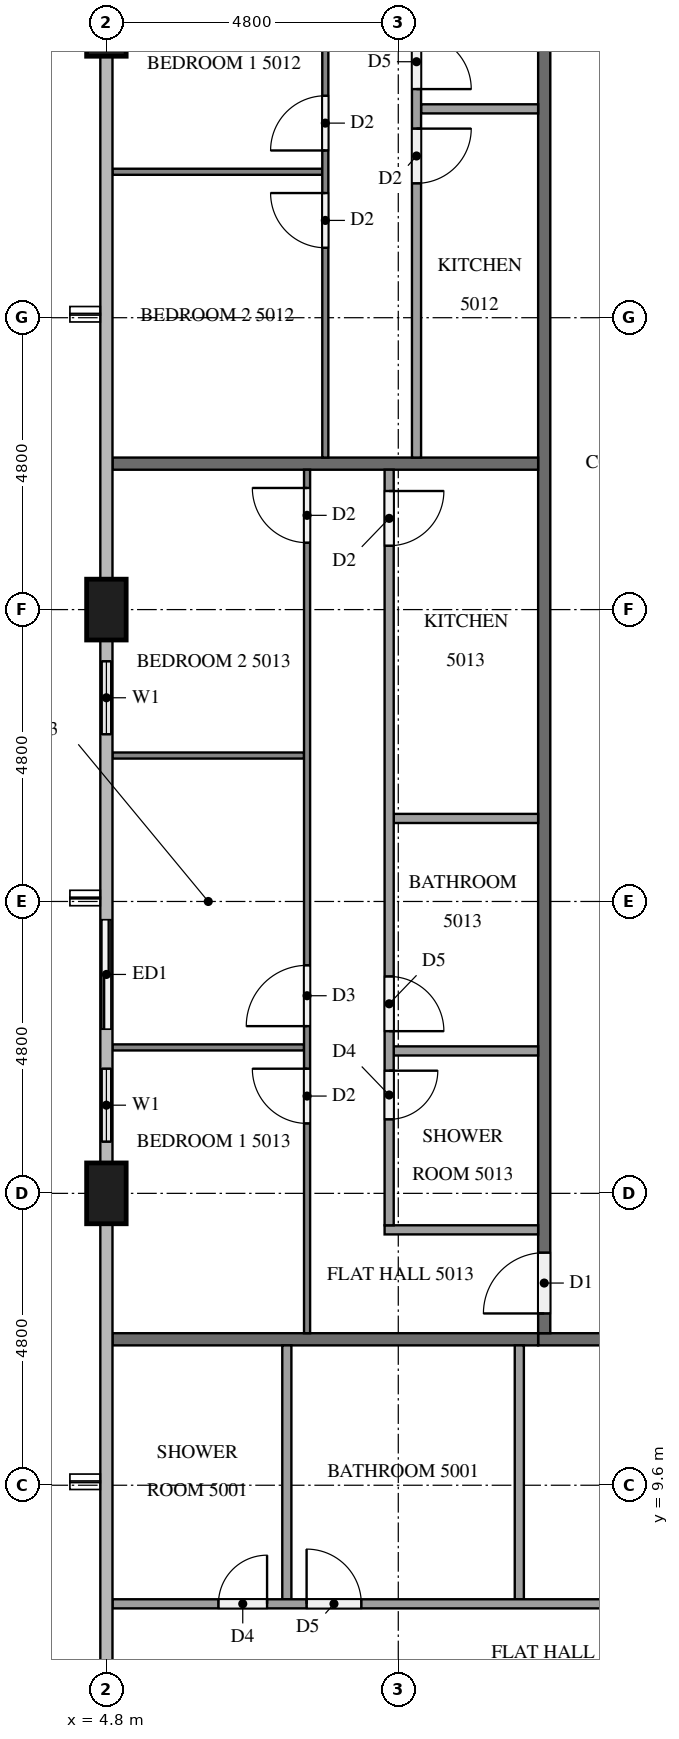
"""IFC4 building model, lengths in metres.
Left out: names, types, materials, properties, quantities, classifications, styles, units other than length and angle.
Written with IfcOpenShell. Run it as: python <this file> out.ifc"""

import sys

from ifc_helpers import new_model, si_unit, direction, frame, frame_2d, origin, origin_2d, place, context, subcontext, project, spatial, rectangle, extrude, element, fill, save


model = new_model("IFC4")
c1 = context("Model", 3, precision=1e-05, world=origin(), true_north=direction((0.0, 1.0)))
c2 = subcontext(c1, "Body", "Model", "MODEL_VIEW")
j1 = project(units=[si_unit("LENGTHUNIT", "METRE"), si_unit("PLANEANGLEUNIT", "RADIAN")], contexts=[c1])
p1 = place(None, origin())
s1 = spatial("IfcSite", under=j1, at=p1, CompositionType="ELEMENT")
p2 = place(p1, origin())
s2 = spatial("IfcBuilding", under=s1, at=p2, CompositionType="ELEMENT")
p3 = place(p2, frame((0.0, 0.0, 192.9)))
s3 = spatial("IfcBuildingStorey", under=s2, at=p3, CompositionType="ELEMENT", Elevation=192.9)
for number, where, z_axis, x_axis in (
    (1, (4.8, 33.6, 0.0), (0.0, 0.0, 1.0), (0.0, 1.0, 0.0)),
    (2, (4.8, 24.0, 0.0), (0.0, 0.0, 1.0), (0.0, 1.0, 0.0)),
    (3, (4.8, 14.4, 0.0), (0.0, 0.0, 1.0), (0.0, 1.0, 0.0)),
):
    element("IfcColumn", number, at=place(p3, frame(where, z_axis=z_axis, x_axis=x_axis)), inside=s3, PredefinedType="COLUMN", context=c2, shape_type="SweptSolid", body=[
        extrude(rectangle(XDim=1.0, YDim=0.65, at=origin_2d()), origin(), (0.0, 0.0, 1.0), 3.2),
    ])
p4 = place(p3, frame((4.8, 23.5, 0.0), z_axis=(0.0, 0.0, 1.0), x_axis=(0.0, -1.0, 0.0)))
e4 = element("IfcWall", 4, at=p4, inside=s3, PredefinedType="SOLIDWALL", context=c2, shape_type="SweptSolid", body=[
    extrude(rectangle(XDim=1.9, YDim=0.15, at=frame_2d((0.95, 0.0))), origin(), (0.0, 0.0, 1.0), 3.2),
])
p5 = place(p4, frame((0.35, 0.0, 0.9)))
e5 = element("IfcOpeningElement", 5, at=p5, cuts=e4, PredefinedType="OPENING", context=c2, shape_type="SweptSolid", body=[
    extrude(rectangle(XDim=1.2, YDim=1.4, at=frame_2d((0.6, 0.7))), frame((0.0, 0.085, 0.0), z_axis=(0.0, -1.0, 0.0), x_axis=(1.0, 0.0, 0.0)), (0.0, 0.0, 1.0), 0.17),
])
p6 = place(p3, frame((4.8, 19.2, 0.0), z_axis=(0.0, 0.0, 1.0), x_axis=(0.0, -1.0, 0.0)))
e6 = element("IfcWall", 6, at=p6, inside=s3, PredefinedType="SOLIDWALL", context=c2, shape_type="SweptSolid", body=[
    extrude(rectangle(XDim=4.3, YDim=0.15, at=frame_2d((2.15, 0.0))), origin(), (0.0, 0.0, 1.0), 3.2),
])
p7 = place(p6, frame((0.3, 0.0, 0.0)))
e7 = element("IfcOpeningElement", 7, at=p7, cuts=e6, PredefinedType="OPENING", context=c2, shape_type="SweptSolid", body=[
    extrude(rectangle(XDim=1.8, YDim=2.4, at=frame_2d((0.9, 1.2))), frame((0.0, 0.085, 0.0), z_axis=(0.0, -1.0, 0.0), x_axis=(1.0, 0.0, 0.0)), (0.0, 0.0, 1.0), 0.17),
])
p8 = place(p6, frame((2.75, 0.0, 0.9)))
e8 = element("IfcOpeningElement", 8, at=p8, cuts=e6, PredefinedType="OPENING", context=c2, shape_type="SweptSolid", body=[
    extrude(rectangle(XDim=1.2, YDim=1.4, at=frame_2d((0.6, 0.7))), frame((0.0, 0.085, 0.0), z_axis=(0.0, -1.0, 0.0), x_axis=(1.0, 0.0, 0.0)), (0.0, 0.0, 1.0), 0.17),
])
p9 = place(p3, frame((50.5, 12.0, 0.0), z_axis=(0.0, 0.0, 1.0), x_axis=(-1.0, 0.0, 0.0)))
e9 = element("IfcWall", 9, at=p9, inside=s3, PredefinedType="PARTITIONING", context=c2, shape_type="SweptSolid", body=[
    extrude(rectangle(XDim=38.6, YDim=0.2, at=frame_2d((19.3, 0.0))), origin(), (0.0, 0.0, 1.0), 3.2),
])
p10 = place(p9, frame((31.725, 0.0, 0.0)))
e10 = element("IfcOpeningElement", 10, at=p10, cuts=e9, PredefinedType="OPENING", context=c2, shape_type="SweptSolid", body=[
    extrude(rectangle(XDim=1.0, YDim=2.1, at=frame_2d((0.5, 1.05))), frame((0.0, 0.11, 0.0), z_axis=(0.0, -1.0, 0.0), x_axis=(1.0, 0.0, 0.0)), (0.0, 0.0, 1.0), 0.22),
])
p11 = place(p9, frame((19.725, 0.0, 0.0)))
e11 = element("IfcOpeningElement", 11, at=p11, cuts=e9, PredefinedType="OPENING", context=c2, shape_type="SweptSolid", body=[
    extrude(rectangle(XDim=1.0, YDim=2.1, at=frame_2d((0.5, 1.05))), frame((0.0, 0.11, 0.0), z_axis=(0.0, -1.0, 0.0), x_axis=(1.0, 0.0, 0.0)), (0.0, 0.0, 1.0), 0.22),
])
p12 = place(p9, frame((17.875, 0.0, 0.0)))
e12 = element("IfcOpeningElement", 12, at=p12, cuts=e9, PredefinedType="OPENING", context=c2, shape_type="SweptSolid", body=[
    extrude(rectangle(XDim=1.0, YDim=2.1, at=frame_2d((0.5, 1.05))), frame((0.0, 0.11, 0.0), z_axis=(0.0, -1.0, 0.0), x_axis=(1.0, 0.0, 0.0)), (0.0, 0.0, 1.0), 0.22),
])
p13 = place(p9, frame((3.475, 0.0, 0.0)))
e13 = element("IfcOpeningElement", 13, at=p13, cuts=e9, PredefinedType="OPENING", context=c2, shape_type="SweptSolid", body=[
    extrude(rectangle(XDim=1.0, YDim=2.1, at=frame_2d((0.5, 1.05))), frame((0.0, 0.11, 0.0), z_axis=(0.0, -1.0, 0.0), x_axis=(1.0, 0.0, 0.0)), (0.0, 0.0, 1.0), 0.22),
])
p14 = place(p3, frame((12.0, 12.1, 0.0), z_axis=(0.0, 0.0, 1.0), x_axis=(0.0, 1.0, 0.0)))
e14 = element("IfcWall", 14, at=p14, inside=s3, PredefinedType="PARTITIONING", context=c2, shape_type="SweptSolid", body=[
    extrude(rectangle(XDim=28.6, YDim=0.2, at=frame_2d((14.3, 0.0))), origin(), (0.0, 0.0, 1.0), 3.2),
])
p15 = place(p14, frame((27.275, 0.0, 0.0)))
e15 = element("IfcOpeningElement", 15, at=p15, cuts=e14, PredefinedType="OPENING", context=c2, shape_type="SweptSolid", body=[
    extrude(rectangle(XDim=1.0, YDim=2.1, at=frame_2d((0.5, 1.05))), frame((0.0, 0.11, 0.0), z_axis=(0.0, -1.0, 0.0), x_axis=(1.0, 0.0, 0.0)), (0.0, 0.0, 1.0), 0.22),
])
p16 = place(p14, frame((0.325, 0.0, 0.0)))
e16 = element("IfcOpeningElement", 16, at=p16, cuts=e14, PredefinedType="OPENING", context=c2, shape_type="SweptSolid", body=[
    extrude(rectangle(XDim=1.0, YDim=2.1, at=frame_2d((0.5, 1.05))), frame((0.0, 0.11, 0.0), z_axis=(0.0, -1.0, 0.0), x_axis=(1.0, 0.0, 0.0)), (0.0, 0.0, 1.0), 0.22),
])
for number, where, z_axis, x_axis in (
    (17, (4.9, 12.0, 0.0), (0.0, 0.0, 1.0), (1.0, 0.0, 0.0)),
    (18, (4.9, 26.4, 0.0), (0.0, 0.0, 1.0), (1.0, 0.0, 0.0)),
):
    element("IfcWall", number, at=place(p3, frame(where, z_axis=z_axis, x_axis=x_axis)), inside=s3, PredefinedType="PARTITIONING", context=c2, shape_type="SweptSolid", body=[
        extrude(rectangle(XDim=7.0, YDim=0.2, at=frame_2d((3.5, 0.0))), origin(), (0.0, 0.0, 1.0), 3.2),
    ])
for number, where, z_axis, x_axis in (
    (19, (11.59, 11.9, 0.0), (0.0, 0.0, 1.0), (0.0, -1.0, 0.0)),
    (20, (7.767, 11.9, 0.0), (0.0, 0.0, 1.0), (0.0, -1.0, 0.0)),
):
    element("IfcWall", number, at=place(p3, frame(where, z_axis=z_axis, x_axis=x_axis)), inside=s3, PredefinedType="PARTITIONING", context=c2, shape_type="SweptSolid", body=[
        extrude(rectangle(XDim=4.175, YDim=0.15, at=frame_2d((2.087, 0.0))), origin(), (0.0, 0.0, 1.0), 3.2),
    ])
p17 = place(p3, frame((4.9, 7.65, 0.0), z_axis=(0.0, 0.0, 1.0), x_axis=(1.0, 0.0, 0.0)))
e21 = element("IfcWall", 21, at=p17, inside=s3, PredefinedType="PARTITIONING", context=c2, shape_type="SweptSolid", body=[
    extrude(rectangle(XDim=12.425, YDim=0.15, at=frame_2d((6.212, 0.0))), origin(), (0.0, 0.0, 1.0), 3.2),
])
p18 = place(p17, frame((11.225, 0.0, 0.0)))
e22 = element("IfcOpeningElement", 22, at=p18, cuts=e21, PredefinedType="OPENING", context=c2, shape_type="SweptSolid", body=[
    extrude(rectangle(XDim=0.9, YDim=2.1, at=frame_2d((0.45, 1.05))), frame((0.0, 0.085, 0.0), z_axis=(0.0, -1.0, 0.0), x_axis=(1.0, 0.0, 0.0)), (0.0, 0.0, 1.0), 0.17),
])
p19 = place(p17, frame((3.192, 0.0, 0.0)))
e23 = element("IfcOpeningElement", 23, at=p19, cuts=e21, PredefinedType="OPENING", context=c2, shape_type="SweptSolid", body=[
    extrude(rectangle(XDim=0.9, YDim=2.1, at=frame_2d((0.45, 1.05))), frame((0.0, 0.085, 0.0), z_axis=(0.0, -1.0, 0.0), x_axis=(1.0, 0.0, 0.0)), (0.0, 0.0, 1.0), 0.17),
])
p20 = place(p17, frame((1.742, 0.0, 0.0)))
e24 = element("IfcOpeningElement", 24, at=p20, cuts=e21, PredefinedType="OPENING", context=c2, shape_type="SweptSolid", body=[
    extrude(rectangle(XDim=0.8, YDim=2.1, at=frame_2d((0.4, 1.05))), frame((0.0, 0.085, 0.0), z_axis=(0.0, -1.0, 0.0), x_axis=(1.0, 0.0, 0.0)), (0.0, 0.0, 1.0), 0.17),
])
p21 = place(p3, frame((8.35, 31.2, 0.0), z_axis=(0.0, 0.0, 1.0), x_axis=(-1.0, 0.0, 0.0)))
e25 = element("IfcWall", 25, at=p21, inside=s3, PredefinedType="PARTITIONING", context=c2, shape_type="SweptSolid", body=[
    extrude(rectangle(XDim=3.45, YDim=0.1, at=frame_2d((1.725, 0.0))), origin(), (0.0, 0.0, 1.0), 3.2),
])
p22 = place(p3, frame((8.4, 26.5, 0.0), z_axis=(0.0, 0.0, 1.0), x_axis=(0.0, 1.0, 0.0)))
e26 = element("IfcWall", 26, at=p22, inside=s3, PredefinedType="PARTITIONING", context=c2, shape_type="SweptSolid", body=[
    extrude(rectangle(XDim=14.2, YDim=0.1, at=frame_2d((7.1, 0.0))), origin(), (0.0, 0.0, 1.0), 3.2),
])
p23 = place(p22, frame((12.9, 0.0, 0.0)))
e27 = element("IfcOpeningElement", 27, at=p23, cuts=e26, PredefinedType="OPENING", context=c2, shape_type="SweptSolid", body=[
    extrude(rectangle(XDim=1.0, YDim=2.1, at=frame_2d((0.5, 1.05))), frame((0.0, 0.06, 0.0), z_axis=(0.0, -1.0, 0.0), x_axis=(1.0, 0.0, 0.0)), (0.0, 0.0, 1.0), 0.12),
])
p24 = place(p22, frame((5.05, 0.0, 0.0)))
e28 = element("IfcOpeningElement", 28, at=p24, cuts=e26, PredefinedType="OPENING", context=c2, shape_type="SweptSolid", body=[
    extrude(rectangle(XDim=0.9, YDim=2.1, at=frame_2d((0.45, 1.05))), frame((0.0, 0.06, 0.0), z_axis=(0.0, -1.0, 0.0), x_axis=(1.0, 0.0, 0.0)), (0.0, 0.0, 1.0), 0.12),
])
p25 = place(p22, frame((3.45, 0.0, 0.0)))
e29 = element("IfcOpeningElement", 29, at=p25, cuts=e26, PredefinedType="OPENING", context=c2, shape_type="SweptSolid", body=[
    extrude(rectangle(XDim=0.9, YDim=2.1, at=frame_2d((0.45, 1.05))), frame((0.0, 0.06, 0.0), z_axis=(0.0, -1.0, 0.0), x_axis=(1.0, 0.0, 0.0)), (0.0, 0.0, 1.0), 0.12),
])
p26 = place(p3, frame((11.9, 32.235, 0.0), z_axis=(0.0, 0.0, 1.0), x_axis=(-1.0, 0.0, 0.0)))
e30 = element("IfcWall", 30, at=p26, inside=s3, PredefinedType="PARTITIONING", context=c2, shape_type="SweptSolid", body=[
    extrude(rectangle(XDim=1.925, YDim=0.15, at=frame_2d((0.962, 0.0))), origin(), (0.0, 0.0, 1.0), 3.2),
])
p27 = place(p3, frame((9.9, 38.925, 0.0), z_axis=(0.0, 0.0, 1.0), x_axis=(0.0, -1.0, 0.0)))
e31 = element("IfcWall", 31, at=p27, inside=s3, PredefinedType="PARTITIONING", context=c2, shape_type="SweptSolid", body=[
    extrude(rectangle(XDim=12.425, YDim=0.15, at=frame_2d((6.212, 0.0))), origin(), (0.0, 0.0, 1.0), 3.2),
])
p28 = place(p27, frame((0.3, 0.0, 0.0)))
e32 = element("IfcOpeningElement", 32, at=p28, cuts=e31, PredefinedType="OPENING", context=c2, shape_type="SweptSolid", body=[
    extrude(rectangle(XDim=0.8, YDim=2.1, at=frame_2d((0.4, 1.05))), frame((0.0, 0.085, 0.0), z_axis=(0.0, -1.0, 0.0), x_axis=(1.0, 0.0, 0.0)), (0.0, 0.0, 1.0), 0.17),
])
p29 = place(p27, frame((5.465, 0.0, 0.0)))
e33 = element("IfcOpeningElement", 33, at=p29, cuts=e31, PredefinedType="OPENING", context=c2, shape_type="SweptSolid", body=[
    extrude(rectangle(XDim=0.9, YDim=2.1, at=frame_2d((0.45, 1.05))), frame((0.0, 0.085, 0.0), z_axis=(0.0, -1.0, 0.0), x_axis=(1.0, 0.0, 0.0)), (0.0, 0.0, 1.0), 0.17),
])
p30 = place(p27, frame((7.015, 0.0, 0.0)))
e34 = element("IfcOpeningElement", 34, at=p30, cuts=e31, PredefinedType="OPENING", context=c2, shape_type="SweptSolid", body=[
    extrude(rectangle(XDim=0.9, YDim=2.1, at=frame_2d((0.45, 1.05))), frame((0.0, 0.085, 0.0), z_axis=(0.0, -1.0, 0.0), x_axis=(1.0, 0.0, 0.0)), (0.0, 0.0, 1.0), 0.17),
])
for number, where, z_axis, x_axis in (
    (35, (8.05, 16.8, 0.0), (0.0, 0.0, 1.0), (-1.0, 0.0, 0.0)),
    (36, (8.05, 21.6, 0.0), (0.0, 0.0, 1.0), (-1.0, 0.0, 0.0)),
):
    element("IfcWall", number, at=place(p3, frame(where, z_axis=z_axis, x_axis=x_axis)), inside=s3, PredefinedType="PARTITIONING", context=c2, shape_type="SweptSolid", body=[
        extrude(rectangle(XDim=3.15, YDim=0.1, at=frame_2d((1.575, 0.0))), origin(), (0.0, 0.0, 1.0), 3.2),
    ])
p31 = place(p3, frame((8.1, 12.1, 0.0), z_axis=(0.0, 0.0, 1.0), x_axis=(0.0, 1.0, 0.0)))
e37 = element("IfcWall", 37, at=p31, inside=s3, PredefinedType="PARTITIONING", context=c2, shape_type="SweptSolid", body=[
    extrude(rectangle(XDim=14.2, YDim=0.1, at=frame_2d((7.1, 0.0))), origin(), (0.0, 0.0, 1.0), 3.2),
])
p32 = place(p31, frame((3.45, 0.0, 0.0)))
e38 = element("IfcOpeningElement", 38, at=p32, cuts=e37, PredefinedType="OPENING", context=c2, shape_type="SweptSolid", body=[
    extrude(rectangle(XDim=0.9, YDim=2.1, at=frame_2d((0.45, 1.05))), frame((0.0, 0.06, 0.0), z_axis=(0.0, -1.0, 0.0), x_axis=(1.0, 0.0, 0.0)), (0.0, 0.0, 1.0), 0.12),
])
p33 = place(p31, frame((5.05, 0.0, 0.0)))
e39 = element("IfcOpeningElement", 39, at=p33, cuts=e37, PredefinedType="OPENING", context=c2, shape_type="SweptSolid", body=[
    extrude(rectangle(XDim=1.0, YDim=2.1, at=frame_2d((0.5, 1.05))), frame((0.0, 0.06, 0.0), z_axis=(0.0, -1.0, 0.0), x_axis=(1.0, 0.0, 0.0)), (0.0, 0.0, 1.0), 0.12),
])
p34 = place(p31, frame((13.0, 0.0, 0.0)))
e40 = element("IfcOpeningElement", 40, at=p34, cuts=e37, PredefinedType="OPENING", context=c2, shape_type="SweptSolid", body=[
    extrude(rectangle(XDim=0.9, YDim=2.1, at=frame_2d((0.45, 1.05))), frame((0.0, 0.06, 0.0), z_axis=(0.0, -1.0, 0.0), x_axis=(1.0, 0.0, 0.0)), (0.0, 0.0, 1.0), 0.12),
])
for number, where, z_axis, x_axis in (
    (41, (11.9, 16.742, 0.0), (0.0, 0.0, 1.0), (-1.0, 0.0, 0.0)),
    (42, (11.9, 20.565, 0.0), (0.0, 0.0, 1.0), (-1.0, 0.0, 0.0)),
):
    element("IfcWall", number, at=place(p3, frame(where, z_axis=z_axis, x_axis=x_axis)), inside=s3, PredefinedType="PARTITIONING", context=c2, shape_type="SweptSolid", body=[
        extrude(rectangle(XDim=2.375, YDim=0.15, at=frame_2d((1.188, 0.0))), origin(), (0.0, 0.0, 1.0), 3.2),
    ])
p35 = place(p3, frame((11.9, 13.8, 0.0), z_axis=(0.0, 0.0, 1.0), x_axis=(-1.0, 0.0, 0.0)))
e43 = element("IfcWall", 43, at=p35, inside=s3, PredefinedType="PARTITIONING", context=c2, shape_type="SweptSolid", body=[
    extrude(rectangle(XDim=2.525, YDim=0.15, at=frame_2d((1.262, 0.0))), origin(), (0.0, 0.0, 1.0), 3.2),
])
p36 = place(p3, frame((9.45, 26.3, 0.0), z_axis=(0.0, 0.0, 1.0), x_axis=(0.0, -1.0, 0.0)))
e44 = element("IfcWall", 44, at=p36, inside=s3, PredefinedType="PARTITIONING", context=c2, shape_type="SweptSolid", body=[
    extrude(rectangle(XDim=12.425, YDim=0.15, at=frame_2d((6.212, 0.0))), origin(), (0.0, 0.0, 1.0), 3.2),
])
p37 = place(p36, frame((9.883, 0.0, 0.0)))
e45 = element("IfcOpeningElement", 45, at=p37, cuts=e44, PredefinedType="OPENING", context=c2, shape_type="SweptSolid", body=[
    extrude(rectangle(XDim=0.8, YDim=2.1, at=frame_2d((0.4, 1.05))), frame((0.0, 0.085, 0.0), z_axis=(0.0, -1.0, 0.0), x_axis=(1.0, 0.0, 0.0)), (0.0, 0.0, 1.0), 0.17),
])
p38 = place(p36, frame((8.333, 0.0, 0.0)))
e46 = element("IfcOpeningElement", 46, at=p38, cuts=e44, PredefinedType="OPENING", context=c2, shape_type="SweptSolid", body=[
    extrude(rectangle(XDim=0.9, YDim=2.1, at=frame_2d((0.45, 1.05))), frame((0.0, 0.085, 0.0), z_axis=(0.0, -1.0, 0.0), x_axis=(1.0, 0.0, 0.0)), (0.0, 0.0, 1.0), 0.17),
])
p39 = place(p36, frame((0.35, 0.0, 0.0)))
e47 = element("IfcOpeningElement", 47, at=p39, cuts=e44, PredefinedType="OPENING", context=c2, shape_type="SweptSolid", body=[
    extrude(rectangle(XDim=0.9, YDim=2.1, at=frame_2d((0.45, 1.05))), frame((0.0, 0.085, 0.0), z_axis=(0.0, -1.0, 0.0), x_axis=(1.0, 0.0, 0.0)), (0.0, 0.0, 1.0), 0.17),
])
p40 = place(p5, origin())
e48 = element("IfcWindow", 48, at=p40, inside=s3, PartitioningType="SINGLE_PANEL", PredefinedType="WINDOW", context=c2, shape_type="SweptSolid", body=[
    extrude(rectangle(XDim=1.2, YDim=1.4, at=frame_2d((0.6, 0.7))), frame((0.0, 0.03, 0.0), z_axis=(0.0, -1.0, 0.0), x_axis=(1.0, 0.0, 0.0)), (0.0, 0.0, 1.0), 0.06),
])
fill(e5, e48)
p41 = place(p7, origin())
e49 = element("IfcDoor", 49, at=p41, inside=s3, OperationType="SLIDING_TO_LEFT", PredefinedType="DOOR", context=c2, shape_type="SweptSolid", body=[
    extrude(rectangle(XDim=1.8, YDim=2.4, at=frame_2d((0.9, 1.2))), frame((0.0, 0.025, 0.0), z_axis=(0.0, -1.0, 0.0), x_axis=(1.0, 0.0, 0.0)), (0.0, 0.0, 1.0), 0.05),
])
fill(e7, e49)
p42 = place(p8, origin())
e50 = element("IfcWindow", 50, at=p42, inside=s3, PartitioningType="SINGLE_PANEL", PredefinedType="WINDOW", context=c2, shape_type="SweptSolid", body=[
    extrude(rectangle(XDim=1.2, YDim=1.4, at=frame_2d((0.6, 0.7))), frame((0.0, 0.03, 0.0), z_axis=(0.0, -1.0, 0.0), x_axis=(1.0, 0.0, 0.0)), (0.0, 0.0, 1.0), 0.06),
])
fill(e8, e50)
p43 = place(p16, origin())
e51 = element("IfcDoor", 51, at=p43, inside=s3, OperationType="SINGLE_SWING_LEFT", PredefinedType="DOOR", context=c2, shape_type="SweptSolid", body=[
    extrude(rectangle(XDim=1.0, YDim=2.1, at=frame_2d((0.5, 1.05))), frame((0.0, 0.025, 0.0), z_axis=(0.0, -1.0, 0.0), x_axis=(1.0, 0.0, 0.0)), (0.0, 0.0, 1.0), 0.05),
])
fill(e16, e51)
p44 = place(p19, origin())
e52 = element("IfcDoor", 52, at=p44, inside=s3, OperationType="SINGLE_SWING_LEFT", PredefinedType="DOOR", context=c2, shape_type="SweptSolid", body=[
    extrude(rectangle(XDim=0.9, YDim=2.1, at=frame_2d((0.45, 1.05))), frame((0.0, 0.025, 0.0), z_axis=(0.0, -1.0, 0.0), x_axis=(1.0, 0.0, 0.0)), (0.0, 0.0, 1.0), 0.05),
])
fill(e23, e52)
p45 = place(p20, origin())
e53 = element("IfcDoor", 53, at=p45, inside=s3, OperationType="SINGLE_SWING_RIGHT", PredefinedType="DOOR", context=c2, shape_type="SweptSolid", body=[
    extrude(rectangle(XDim=0.8, YDim=2.1, at=frame_2d((0.4, 1.05))), frame((0.0, 0.025, 0.0), z_axis=(0.0, -1.0, 0.0), x_axis=(1.0, 0.0, 0.0)), (0.0, 0.0, 1.0), 0.05),
])
fill(e24, e53)
p46 = place(p24, origin())
e54 = element("IfcDoor", 54, at=p46, inside=s3, OperationType="SINGLE_SWING_LEFT", PredefinedType="DOOR", context=c2, shape_type="SweptSolid", body=[
    extrude(rectangle(XDim=0.9, YDim=2.1, at=frame_2d((0.45, 1.05))), frame((0.0, 0.025, 0.0), z_axis=(0.0, -1.0, 0.0), x_axis=(1.0, 0.0, 0.0)), (0.0, 0.0, 1.0), 0.05),
])
fill(e28, e54)
p47 = place(p25, origin())
e55 = element("IfcDoor", 55, at=p47, inside=s3, OperationType="SINGLE_SWING_RIGHT", PredefinedType="DOOR", context=c2, shape_type="SweptSolid", body=[
    extrude(rectangle(XDim=0.9, YDim=2.1, at=frame_2d((0.45, 1.05))), frame((0.0, 0.025, 0.0), z_axis=(0.0, -1.0, 0.0), x_axis=(1.0, 0.0, 0.0)), (0.0, 0.0, 1.0), 0.05),
])
fill(e29, e55)
p48 = place(p29, origin())
e56 = element("IfcDoor", 56, at=p48, inside=s3, OperationType="SINGLE_SWING_RIGHT", PredefinedType="DOOR", context=c2, shape_type="SweptSolid", body=[
    extrude(rectangle(XDim=0.9, YDim=2.1, at=frame_2d((0.45, 1.05))), frame((0.0, 0.025, 0.0), z_axis=(0.0, -1.0, 0.0), x_axis=(1.0, 0.0, 0.0)), (0.0, 0.0, 1.0), 0.05),
])
fill(e33, e56)
p49 = place(p30, origin())
e57 = element("IfcDoor", 57, at=p49, inside=s3, OperationType="SINGLE_SWING_LEFT", PredefinedType="DOOR", context=c2, shape_type="SweptSolid", body=[
    extrude(rectangle(XDim=0.9, YDim=2.1, at=frame_2d((0.45, 1.05))), frame((0.0, 0.025, 0.0), z_axis=(0.0, -1.0, 0.0), x_axis=(1.0, 0.0, 0.0)), (0.0, 0.0, 1.0), 0.05),
])
fill(e34, e57)
p50 = place(p32, origin())
e58 = element("IfcDoor", 58, at=p50, inside=s3, OperationType="SINGLE_SWING_RIGHT", PredefinedType="DOOR", context=c2, shape_type="SweptSolid", body=[
    extrude(rectangle(XDim=0.9, YDim=2.1, at=frame_2d((0.45, 1.05))), frame((0.0, 0.025, 0.0), z_axis=(0.0, -1.0, 0.0), x_axis=(1.0, 0.0, 0.0)), (0.0, 0.0, 1.0), 0.05),
])
fill(e38, e58)
p51 = place(p33, origin())
e59 = element("IfcDoor", 59, at=p51, inside=s3, OperationType="SINGLE_SWING_LEFT", PredefinedType="DOOR", context=c2, shape_type="SweptSolid", body=[
    extrude(rectangle(XDim=1.0, YDim=2.1, at=frame_2d((0.5, 1.05))), frame((0.0, 0.025, 0.0), z_axis=(0.0, -1.0, 0.0), x_axis=(1.0, 0.0, 0.0)), (0.0, 0.0, 1.0), 0.05),
])
fill(e39, e59)
p52 = place(p34, origin())
e60 = element("IfcDoor", 60, at=p52, inside=s3, OperationType="SINGLE_SWING_RIGHT", PredefinedType="DOOR", context=c2, shape_type="SweptSolid", body=[
    extrude(rectangle(XDim=0.9, YDim=2.1, at=frame_2d((0.45, 1.05))), frame((0.0, 0.025, 0.0), z_axis=(0.0, -1.0, 0.0), x_axis=(1.0, 0.0, 0.0)), (0.0, 0.0, 1.0), 0.05),
])
fill(e40, e60)
p53 = place(p37, origin())
e61 = element("IfcDoor", 61, at=p53, inside=s3, OperationType="SINGLE_SWING_LEFT", PredefinedType="DOOR", context=c2, shape_type="SweptSolid", body=[
    extrude(rectangle(XDim=0.8, YDim=2.1, at=frame_2d((0.4, 1.05))), frame((0.0, 0.025, 0.0), z_axis=(0.0, -1.0, 0.0), x_axis=(1.0, 0.0, 0.0)), (0.0, 0.0, 1.0), 0.05),
])
fill(e45, e61)
p54 = place(p38, origin())
e62 = element("IfcDoor", 62, at=p54, inside=s3, OperationType="SINGLE_SWING_RIGHT", PredefinedType="DOOR", context=c2, shape_type="SweptSolid", body=[
    extrude(rectangle(XDim=0.9, YDim=2.1, at=frame_2d((0.45, 1.05))), frame((0.0, 0.025, 0.0), z_axis=(0.0, -1.0, 0.0), x_axis=(1.0, 0.0, 0.0)), (0.0, 0.0, 1.0), 0.05),
])
fill(e46, e62)
p55 = place(p39, origin())
e63 = element("IfcDoor", 63, at=p55, inside=s3, OperationType="SINGLE_SWING_LEFT", PredefinedType="DOOR", context=c2, shape_type="SweptSolid", body=[
    extrude(rectangle(XDim=0.9, YDim=2.1, at=frame_2d((0.45, 1.05))), frame((0.0, 0.025, 0.0), z_axis=(0.0, -1.0, 0.0), x_axis=(1.0, 0.0, 0.0)), (0.0, 0.0, 1.0), 0.05),
])
fill(e47, e63)
save(model, sys.argv[1])
